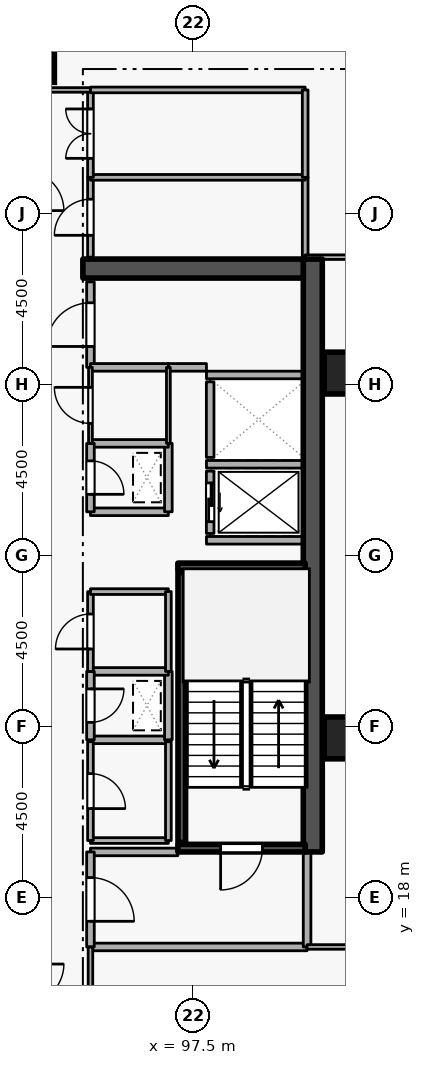
"""IFC4 building model, lengths in metres.
Left out: names, types, materials, properties, quantities, classifications, styles, units other than length and angle.
Written with IfcOpenShell. Run it as: python <this file> out.ifc"""

import sys

from ifc_helpers import new_model, si_unit, direction, frame, frame_2d, origin, origin_2d, place, context, subcontext, project, spatial, rectangle, extrude, element, fill, save


model = new_model("IFC4")
c1 = context("Model", 3, precision=1e-05, world=origin(), true_north=direction((0.0, 1.0)))
c2 = subcontext(c1, "Body", "Model", "MODEL_VIEW")
j1 = project(units=[si_unit("LENGTHUNIT", "METRE"), si_unit("PLANEANGLEUNIT", "RADIAN")], contexts=[c1])
p1 = place(None, origin())
s1 = spatial("IfcSite", under=j1, at=p1, CompositionType="ELEMENT")
p2 = place(p1, origin())
s2 = spatial("IfcBuilding", under=s1, at=p2, CompositionType="ELEMENT")
p3 = place(p2, frame((0.0, 0.0, 163.5)))
s3 = spatial("IfcBuildingStorey", under=s2, at=p3, CompositionType="ELEMENT", Elevation=163.5)
p4 = place(p3, frame((100.65, 19.2, 0.0), z_axis=(0.0, 0.0, 1.0), x_axis=(0.0, 1.0, 0.0)))
e1 = element("IfcWall", 1, at=p4, inside=s3, PredefinedType="SHEAR", context=c2, shape_type="SweptSolid", body=[
    extrude(rectangle(XDim=15.6, YDim=0.5, at=frame_2d((7.8, 0.0))), origin(), (0.0, 0.0, 1.0), 3.6),
])
p5 = place(p3, frame((94.6, 34.55, 0.0), z_axis=(0.0, 0.0, 1.0), x_axis=(1.0, 0.0, 0.0)))
e2 = element("IfcWall", 2, at=p5, inside=s3, PredefinedType="SHEAR", context=c2, shape_type="SweptSolid", body=[
    extrude(rectangle(XDim=5.8, YDim=0.5, at=frame_2d((2.9, 0.0))), origin(), (0.0, 0.0, 1.0), 3.6),
])
for number, where, z_axis, x_axis in (
    (3, (93.3, 40.0, 0.0), (0.0, 0.0, 1.0), (1.0, 0.0, 0.0)),
    (4, (101.5, 22.2, 0.0), (0.0, 0.0, 1.0), (1.0, 0.0, 0.0)),
    (5, (101.5, 31.8, 0.0), (0.0, 0.0, 1.0), (1.0, 0.0, 0.0)),
):
    element("IfcColumn", number, at=place(p3, frame(where, z_axis=z_axis, x_axis=x_axis)), inside=s3, PredefinedType="COLUMN", context=c2, shape_type="SweptSolid", body=[
        extrude(rectangle(XDim=1.1, YDim=1.1, at=origin_2d()), origin(), (0.0, 0.0, 1.0), 3.6),
    ])
p6 = place(p3, frame((97.95, 29.22, 0.0), z_axis=(0.0, 0.0, 1.0), x_axis=(0.0, -1.0, 0.0)))
e6 = element("IfcWall", 6, at=p6, inside=s3, PredefinedType="STANDARD", context=c2, shape_type="SweptSolid", body=[
    extrude(rectangle(XDim=1.64, YDim=0.2, at=frame_2d((0.82, 0.0))), origin(), (0.0, 0.0, 1.0), 3.34),
])
p7 = place(p6, frame((0.31, 0.0, 0.0)))
e7 = element("IfcOpeningElement", 7, at=p7, cuts=e6, PredefinedType="OPENING", context=c2, shape_type="SweptSolid", body=[
    extrude(rectangle(XDim=1.02, YDim=2.06, at=frame_2d((0.51, 1.03))), frame((0.0, 0.11, 0.0), z_axis=(0.0, -1.0, 0.0), x_axis=(1.0, 0.0, 0.0)), (0.0, 0.0, 1.0), 0.22),
])
p8 = place(p3, frame((97.95, 31.57, 0.0), z_axis=(0.0, 0.0, 1.0), x_axis=(0.0, -1.0, 0.0)))
e8 = element("IfcWall", 8, at=p8, inside=s3, PredefinedType="STANDARD", context=c2, shape_type="SweptSolid", body=[
    extrude(rectangle(XDim=1.99, YDim=0.2, at=frame_2d((0.995, 0.0))), origin(), (0.0, 0.0, 1.0), 3.34),
])
for number, where, z_axis, x_axis in (
    (9, (97.852, 29.4, 0.0), (0.0, 0.0, 1.0), (1.0, 0.0, 0.0)),
    (10, (97.852, 27.4, 0.0), (0.0, 0.0, 1.0), (1.0, 0.0, 0.0)),
    (11, (97.852, 31.75, 0.0), (0.0, 0.0, 1.0), (1.0, 0.0, 0.0)),
):
    element("IfcWall", number, at=place(p3, frame(where, z_axis=z_axis, x_axis=x_axis)), inside=s3, PredefinedType="STANDARD", context=c2, shape_type="SweptSolid", body=[
        extrude(rectangle(XDim=2.536, YDim=0.2, at=frame_2d((1.268, 0.0))), origin(), (0.0, 0.0, 1.0), 3.34),
    ])
p9 = place(p3, frame((100.45, 19.3, 0.0), z_axis=(0.0, 0.0, 1.0), x_axis=(-1.0, 0.0, 0.0)))
e12 = element("IfcWall", 12, at=p9, inside=s3, PredefinedType="SHEAR", context=c2, shape_type="SweptSolid", body=[
    extrude(rectangle(XDim=3.35, YDim=0.2, at=frame_2d((1.675, 0.0))), origin(), (0.0, 0.0, 1.0), 3.6),
])
p10 = place(p9, frame((1.125, 0.0, 0.0)))
e13 = element("IfcOpeningElement", 13, at=p10, cuts=e12, PredefinedType="OPENING", context=c2, shape_type="SweptSolid", body=[
    extrude(rectangle(XDim=1.1, YDim=2.1, at=frame_2d((0.55, 1.05))), frame((0.0, 0.11, 0.0), z_axis=(0.0, -1.0, 0.0), x_axis=(1.0, 0.0, 0.0)), (0.0, 0.0, 1.0), 0.22),
])
p11 = place(p3, frame((97.1, 26.7, 0.0), z_axis=(0.0, 0.0, 1.0), x_axis=(1.0, 0.0, 0.0)))
e14 = element("IfcWall", 14, at=p11, inside=s3, PredefinedType="SHEAR", context=c2, shape_type="SweptSolid", body=[
    extrude(rectangle(XDim=3.35, YDim=0.2, at=frame_2d((1.675, 0.0))), origin(), (0.0, 0.0, 1.0), 3.6),
])
p12 = place(p3, frame((97.203, 26.55, 0.0), z_axis=(0.0, 0.0, 1.0), x_axis=(0.0, -1.0, 0.0)))
e15 = element("IfcWall", 15, at=p12, inside=s3, PredefinedType="SHEAR", context=c2, shape_type="SweptSolid", body=[
    extrude(rectangle(XDim=7.1, YDim=0.2, at=frame_2d((3.55, 0.0))), origin(), (0.0, 0.0, 1.0), 3.6),
])
p13 = place(p3, frame((94.8, 16.7, 0.0), z_axis=(0.0, 0.0, 1.0), x_axis=(1.0, 0.0, 0.0)))
e16 = element("IfcWall", 16, at=p13, inside=s3, PredefinedType="STANDARD", context=c2, shape_type="SweptSolid", body=[
    extrude(rectangle(XDim=5.7, YDim=0.2, at=frame_2d((2.85, 0.0))), origin(), (0.0, 0.0, 1.0), 3.34),
])
p14 = place(p3, frame((100.5, 16.7, 0.0), z_axis=(0.0, 0.0, 1.0), x_axis=(0.0, 1.0, 0.0)))
e17 = element("IfcWall", 17, at=p14, inside=s3, PredefinedType="STANDARD", context=c2, shape_type="SweptSolid", body=[
    extrude(rectangle(XDim=2.5, YDim=0.2, at=frame_2d((1.25, 0.0))), origin(), (0.0, 0.0, 1.0), 3.34),
])
p15 = place(p3, frame((97.1, 19.2, 0.0), z_axis=(0.0, 0.0, 1.0), x_axis=(-1.0, 0.0, 0.0)))
e18 = element("IfcWall", 18, at=p15, inside=s3, PredefinedType="STANDARD", context=c2, shape_type="SweptSolid", body=[
    extrude(rectangle(XDim=2.3, YDim=0.2, at=frame_2d((1.15, 0.0))), origin(), (0.0, 0.0, 1.0), 2.545),
])
p16 = place(p3, frame((94.8, 19.2, 0.0), z_axis=(0.0, 0.0, 1.0), x_axis=(0.0, -1.0, 0.0)))
e19 = element("IfcWall", 19, at=p16, inside=s3, PredefinedType="STANDARD", context=c2, shape_type="SweptSolid", body=[
    extrude(rectangle(XDim=2.5, YDim=0.2, at=frame_2d((1.25, 0.0))), origin(), (0.0, 0.0, 1.0), 3.34),
])
p17 = place(p16, frame((0.675, 0.0, 0.0)))
e20 = element("IfcOpeningElement", 20, at=p17, cuts=e19, PredefinedType="OPENING", context=c2, shape_type="SweptSolid", body=[
    extrude(rectangle(XDim=1.15, YDim=2.1, at=frame_2d((0.575, 1.05))), frame((0.0, 0.11, 0.0), z_axis=(0.0, -1.0, 0.0), x_axis=(1.0, 0.0, 0.0)), (0.0, 0.0, 1.0), 0.22),
])
p18 = place(p3, frame((94.8, 28.15, 0.0), z_axis=(0.0, 0.0, 1.0), x_axis=(1.0, 0.0, 0.0)))
e21 = element("IfcWall", 21, at=p18, inside=s3, PredefinedType="STANDARD", context=c2, shape_type="SweptSolid", body=[
    extrude(rectangle(XDim=2.05, YDim=0.2, at=frame_2d((1.025, 0.0))), origin(), (0.0, 0.0, 1.0), 3.34),
])
p19 = place(p3, frame((96.85, 28.15, 0.0), z_axis=(0.0, 0.0, 1.0), x_axis=(0.0, 1.0, 0.0)))
e22 = element("IfcWall", 22, at=p19, inside=s3, PredefinedType="STANDARD", context=c2, shape_type="SweptSolid", body=[
    extrude(rectangle(XDim=1.8, YDim=0.2, at=frame_2d((0.9, 0.0))), origin(), (0.0, 0.0, 1.0), 3.34),
])
p20 = place(p3, frame((96.85, 29.95, 0.0), z_axis=(0.0, 0.0, 1.0), x_axis=(-1.0, 0.0, 0.0)))
e23 = element("IfcWall", 23, at=p20, inside=s3, PredefinedType="STANDARD", context=c2, shape_type="SweptSolid", body=[
    extrude(rectangle(XDim=2.05, YDim=0.2, at=frame_2d((1.025, 0.0))), origin(), (0.0, 0.0, 1.0), 3.34),
])
p21 = place(p3, frame((94.8, 29.95, 0.0), z_axis=(0.0, 0.0, 1.0), x_axis=(0.0, -1.0, 0.0)))
e24 = element("IfcWall", 24, at=p21, inside=s3, PredefinedType="STANDARD", context=c2, shape_type="SweptSolid", body=[
    extrude(rectangle(XDim=1.8, YDim=0.2, at=frame_2d((0.9, 0.0))), origin(), (0.0, 0.0, 1.0), 3.34),
])
p22 = place(p21, frame((0.46, 0.0, 0.0)))
e25 = element("IfcOpeningElement", 25, at=p22, cuts=e24, PredefinedType="OPENING", context=c2, shape_type="SweptSolid", body=[
    extrude(rectangle(XDim=0.88, YDim=2.04, at=frame_2d((0.44, 1.02))), frame((0.0, 0.11, 0.0), z_axis=(0.0, -1.0, 0.0), x_axis=(1.0, 0.0, 0.0)), (0.0, 0.0, 1.0), 0.22),
])
p23 = place(p3, frame((94.8, 22.15, 0.0), z_axis=(0.0, 0.0, 1.0), x_axis=(1.0, 0.0, 0.0)))
e26 = element("IfcWall", 26, at=p23, inside=s3, PredefinedType="STANDARD", context=c2, shape_type="SweptSolid", body=[
    extrude(rectangle(XDim=2.05, YDim=0.2, at=frame_2d((1.025, 0.0))), origin(), (0.0, 0.0, 1.0), 3.34),
])
p24 = place(p3, frame((96.85, 22.15, 0.0), z_axis=(0.0, 0.0, 1.0), x_axis=(0.0, 1.0, 0.0)))
e27 = element("IfcWall", 27, at=p24, inside=s3, PredefinedType="STANDARD", context=c2, shape_type="SweptSolid", body=[
    extrude(rectangle(XDim=1.8, YDim=0.2, at=frame_2d((0.9, 0.0))), origin(), (0.0, 0.0, 1.0), 3.34),
])
p25 = place(p3, frame((96.85, 23.95, 0.0), z_axis=(0.0, 0.0, 1.0), x_axis=(-1.0, 0.0, 0.0)))
e28 = element("IfcWall", 28, at=p25, inside=s3, PredefinedType="STANDARD", context=c2, shape_type="SweptSolid", body=[
    extrude(rectangle(XDim=2.05, YDim=0.2, at=frame_2d((1.025, 0.0))), origin(), (0.0, 0.0, 1.0), 3.34),
])
p26 = place(p3, frame((94.8, 23.95, 0.0), z_axis=(0.0, 0.0, 1.0), x_axis=(0.0, -1.0, 0.0)))
e29 = element("IfcWall", 29, at=p26, inside=s3, PredefinedType="STANDARD", context=c2, shape_type="SweptSolid", body=[
    extrude(rectangle(XDim=1.8, YDim=0.2, at=frame_2d((0.9, 0.0))), origin(), (0.0, 0.0, 1.0), 3.34),
])
p27 = place(p26, frame((0.46, 0.0, 0.0)))
e30 = element("IfcOpeningElement", 30, at=p27, cuts=e29, PredefinedType="OPENING", context=c2, shape_type="SweptSolid", body=[
    extrude(rectangle(XDim=0.88, YDim=2.04, at=frame_2d((0.44, 1.02))), frame((0.0, 0.11, 0.0), z_axis=(0.0, -1.0, 0.0), x_axis=(1.0, 0.0, 0.0)), (0.0, 0.0, 1.0), 0.22),
])
p28 = place(p3, frame((94.8, 31.95, 0.0), z_axis=(0.0, 0.0, 1.0), x_axis=(0.0, 1.0, 0.0)))
e31 = element("IfcWall", 31, at=p28, inside=s3, PredefinedType="STANDARD", context=c2, shape_type="SweptSolid", body=[
    extrude(rectangle(XDim=2.25, YDim=0.2, at=frame_2d((1.125, 0.0))), origin(), (0.0, 0.0, 1.0), 3.34),
])
p29 = place(p28, frame((0.55, 0.0, 0.0)))
e32 = element("IfcOpeningElement", 32, at=p29, cuts=e31, PredefinedType="OPENING", context=c2, shape_type="SweptSolid", body=[
    extrude(rectangle(XDim=1.15, YDim=2.1, at=frame_2d((0.575, 1.05))), frame((0.0, 0.11, 0.0), z_axis=(0.0, -1.0, 0.0), x_axis=(1.0, 0.0, 0.0)), (0.0, 0.0, 1.0), 0.22),
])
p30 = place(p3, frame((97.852, 31.95, 0.0), z_axis=(0.0, 0.0, 1.0), x_axis=(-1.0, 0.0, 0.0)))
e33 = element("IfcWall", 33, at=p30, inside=s3, PredefinedType="STANDARD", context=c2, shape_type="SweptSolid", body=[
    extrude(rectangle(XDim=1.002, YDim=0.2, at=frame_2d((0.501, 0.0))), origin(), (0.0, 0.0, 1.0), 3.34),
])
p31 = place(p3, frame((96.85, 31.95, 0.0), z_axis=(0.0, 0.0, 1.0), x_axis=(-1.0, 0.0, 0.0)))
e34 = element("IfcWall", 34, at=p31, inside=s3, PredefinedType="STANDARD", context=c2, shape_type="SweptSolid", body=[
    extrude(rectangle(XDim=2.05, YDim=0.2, at=frame_2d((1.025, 0.0))), origin(), (0.0, 0.0, 1.0), 3.34),
])
p32 = place(p3, frame((94.8, 19.5, 0.0), z_axis=(0.0, 0.0, 1.0), x_axis=(1.0, 0.0, 0.0)))
e35 = element("IfcWall", 35, at=p32, inside=s3, PredefinedType="PARTITIONING", context=c2, shape_type="SweptSolid", body=[
    extrude(rectangle(XDim=2.05, YDim=0.15, at=frame_2d((1.025, 0.0))), origin(), (0.0, 0.0, 1.0), 2.545),
])
p33 = place(p3, frame((96.85, 19.5, 0.0), z_axis=(0.0, 0.0, 1.0), x_axis=(0.0, 1.0, 0.0)))
e36 = element("IfcWall", 36, at=p33, inside=s3, PredefinedType="PARTITIONING", context=c2, shape_type="SweptSolid", body=[
    extrude(rectangle(XDim=2.6, YDim=0.15, at=frame_2d((1.3, 0.0))), origin(), (0.0, 0.0, 1.0), 3.34),
])
p34 = place(p3, frame((94.8, 22.1, 0.0), z_axis=(0.0, 0.0, 1.0), x_axis=(0.0, -1.0, 0.0)))
e37 = element("IfcWall", 37, at=p34, inside=s3, PredefinedType="PARTITIONING", context=c2, shape_type="SweptSolid", body=[
    extrude(rectangle(XDim=2.6, YDim=0.15, at=frame_2d((1.3, 0.0))), origin(), (0.0, 0.0, 1.0), 3.34),
])
p35 = place(p34, frame((0.84, 0.0, 0.0)))
e38 = element("IfcOpeningElement", 38, at=p35, cuts=e37, PredefinedType="OPENING", context=c2, shape_type="SweptSolid", body=[
    extrude(rectangle(XDim=0.92, YDim=2.08, at=frame_2d((0.46, 1.04))), frame((0.0, 0.085, 0.0), z_axis=(0.0, -1.0, 0.0), x_axis=(1.0, 0.0, 0.0)), (0.0, 0.0, 1.0), 0.17),
])
p36 = place(p3, frame((94.8, 23.95, 0.0), z_axis=(0.0, 0.0, 1.0), x_axis=(0.0, 1.0, 0.0)))
e39 = element("IfcWall", 39, at=p36, inside=s3, PredefinedType="PARTITIONING", context=c2, shape_type="SweptSolid", body=[
    extrude(rectangle(XDim=2.1, YDim=0.15, at=frame_2d((1.05, 0.0))), origin(), (0.0, 0.0, 1.0), 3.34),
])
p37 = place(p36, frame((0.59, 0.0, 0.0)))
e40 = element("IfcOpeningElement", 40, at=p37, cuts=e39, PredefinedType="OPENING", context=c2, shape_type="SweptSolid", body=[
    extrude(rectangle(XDim=0.92, YDim=2.08, at=frame_2d((0.46, 1.04))), frame((0.0, 0.085, 0.0), z_axis=(0.0, -1.0, 0.0), x_axis=(1.0, 0.0, 0.0)), (0.0, 0.0, 1.0), 0.17),
])
p38 = place(p3, frame((94.8, 26.05, 0.0), z_axis=(0.0, 0.0, 1.0), x_axis=(1.0, 0.0, 0.0)))
e41 = element("IfcWall", 41, at=p38, inside=s3, PredefinedType="PARTITIONING", context=c2, shape_type="SweptSolid", body=[
    extrude(rectangle(XDim=2.05, YDim=0.15, at=frame_2d((1.025, 0.0))), origin(), (0.0, 0.0, 1.0), 3.34),
])
p39 = place(p3, frame((96.85, 26.05, 0.0), z_axis=(0.0, 0.0, 1.0), x_axis=(0.0, -1.0, 0.0)))
e42 = element("IfcWall", 42, at=p39, inside=s3, PredefinedType="PARTITIONING", context=c2, shape_type="SweptSolid", body=[
    extrude(rectangle(XDim=2.1, YDim=0.15, at=frame_2d((1.05, 0.0))), origin(), (0.0, 0.0, 1.0), 3.34),
])
p40 = place(p3, frame((94.8, 29.95, 0.0), z_axis=(0.0, 0.0, 1.0), x_axis=(0.0, 1.0, 0.0)))
e43 = element("IfcWall", 43, at=p40, inside=s3, PredefinedType="PARTITIONING", context=c2, shape_type="SweptSolid", body=[
    extrude(rectangle(XDim=2.0, YDim=0.1, at=frame_2d((1.0, 0.0))), origin(), (0.0, 0.0, 1.0), 3.34),
])
p41 = place(p40, frame((0.525, 0.0, 0.0)))
e44 = element("IfcOpeningElement", 44, at=p41, cuts=e43, PredefinedType="OPENING", context=c2, shape_type="SweptSolid", body=[
    extrude(rectangle(XDim=0.95, YDim=2.1, at=frame_2d((0.475, 1.05))), frame((0.0, 0.06, 0.0), z_axis=(0.0, -1.0, 0.0), x_axis=(1.0, 0.0, 0.0)), (0.0, 0.0, 1.0), 0.12),
])
p42 = place(p3, frame((96.85, 31.95, 0.0), z_axis=(0.0, 0.0, 1.0), x_axis=(0.0, -1.0, 0.0)))
e45 = element("IfcWall", 45, at=p42, inside=s3, PredefinedType="PARTITIONING", context=c2, shape_type="SweptSolid", body=[
    extrude(rectangle(XDim=2.0, YDim=0.1, at=frame_2d((1.0, 0.0))), origin(), (0.0, 0.0, 1.0), 3.34),
])
p43 = place(p3, frame((100.45, 36.95, 0.0), z_axis=(0.0, 0.0, 1.0), x_axis=(0.0, -1.0, 0.0)))
e46 = element("IfcWall", 46, at=p43, inside=s3, PredefinedType="PARTITIONING", context=c2, shape_type="SweptSolid", body=[
    extrude(rectangle(XDim=2.1, YDim=0.15, at=frame_2d((1.05, 0.0))), origin(), (0.0, 0.0, 1.0), 3.34),
])
p44 = place(p3, frame((94.8, 34.85, 0.0), z_axis=(0.0, 0.0, 1.0), x_axis=(0.0, 1.0, 0.0)))
e47 = element("IfcWall", 47, at=p44, inside=s3, PredefinedType="PARTITIONING", context=c2, shape_type="SweptSolid", body=[
    extrude(rectangle(XDim=2.1, YDim=0.15, at=frame_2d((1.05, 0.0))), origin(), (0.0, 0.0, 1.0), 3.34),
])
p45 = place(p44, frame((0.575, 0.0, 0.0)))
e48 = element("IfcOpeningElement", 48, at=p45, cuts=e47, PredefinedType="OPENING", context=c2, shape_type="SweptSolid", body=[
    extrude(rectangle(XDim=0.95, YDim=2.1, at=frame_2d((0.475, 1.05))), frame((0.0, 0.085, 0.0), z_axis=(0.0, -1.0, 0.0), x_axis=(1.0, 0.0, 0.0)), (0.0, 0.0, 1.0), 0.17),
])
p46 = place(p3, frame((94.8, 36.95, 0.0), z_axis=(0.0, 0.0, 1.0), x_axis=(1.0, 0.0, 0.0)))
e49 = element("IfcWall", 49, at=p46, inside=s3, PredefinedType="PARTITIONING", context=c2, shape_type="SweptSolid", body=[
    extrude(rectangle(XDim=5.65, YDim=0.15, at=frame_2d((2.825, 0.0))), origin(), (0.0, 0.0, 1.0), 3.34),
])
p47 = place(p3, frame((94.8, 36.95, 0.0), z_axis=(0.0, 0.0, 1.0), x_axis=(0.0, 1.0, 0.0)))
e50 = element("IfcWall", 50, at=p47, inside=s3, PredefinedType="PARTITIONING", context=c2, shape_type="SweptSolid", body=[
    extrude(rectangle(XDim=2.3, YDim=0.15, at=frame_2d((1.15, 0.0))), origin(), (0.0, 0.0, 1.0), 3.34),
])
p48 = place(p47, frame((0.5, 0.0, 0.0)))
e51 = element("IfcOpeningElement", 51, at=p48, cuts=e50, PredefinedType="OPENING", context=c2, shape_type="SweptSolid", body=[
    extrude(rectangle(XDim=1.3, YDim=2.12, at=frame_2d((0.65, 1.06))), frame((0.0, 0.085, 0.0), z_axis=(0.0, -1.0, 0.0), x_axis=(1.0, 0.0, 0.0)), (0.0, 0.0, 1.0), 0.17),
])
p49 = place(p3, frame((94.8, 39.25, 0.0), z_axis=(0.0, 0.0, 1.0), x_axis=(1.0, 0.0, 0.0)))
e52 = element("IfcWall", 52, at=p49, inside=s3, PredefinedType="PARTITIONING", context=c2, shape_type="SweptSolid", body=[
    extrude(rectangle(XDim=5.65, YDim=0.15, at=frame_2d((2.825, 0.0))), origin(), (0.0, 0.0, 1.0), 3.34),
])
p50 = place(p3, frame((100.45, 39.25, 0.0), z_axis=(0.0, 0.0, 1.0), x_axis=(0.0, -1.0, 0.0)))
e53 = element("IfcWall", 53, at=p50, inside=s3, PredefinedType="PARTITIONING", context=c2, shape_type="SweptSolid", body=[
    extrude(rectangle(XDim=2.3, YDim=0.15, at=frame_2d((1.15, 0.0))), origin(), (0.0, 0.0, 1.0), 3.34),
])
p51 = place(p3, frame((94.8, 14.75, 0.0), z_axis=(0.0, 0.0, 1.0), x_axis=(0.0, 1.0, 0.0)))
e54 = element("IfcWall", 54, at=p51, inside=s3, PredefinedType="PARTITIONING", context=c2, shape_type="SweptSolid", body=[
    extrude(rectangle(XDim=1.95, YDim=0.12, at=frame_2d((0.975, 0.0))), origin(), (0.0, 0.0, 1.0), 3.34),
])
p52 = place(p3, frame((100.5, 16.7, 0.0), z_axis=(0.0, 0.0, 1.0), x_axis=(1.0, 0.0, 0.0)))
e55 = element("IfcWall", 55, at=p52, inside=s3, PredefinedType="PARTITIONING", context=c2, shape_type="SweptSolid", body=[
    extrude(rectangle(XDim=11.72, YDim=0.12, at=frame_2d((5.86, 0.0))), origin(), (0.0, 0.0, 1.0), 3.34),
])
p53 = place(p3, frame((94.8, 39.25, 0.0), z_axis=(0.0, 0.0, 1.0), x_axis=(-1.0, 0.0, 0.0)))
e56 = element("IfcWall", 56, at=p53, inside=s3, PredefinedType="PARTITIONING", context=c2, shape_type="SweptSolid", body=[
    extrude(rectangle(XDim=1.75, YDim=0.12, at=frame_2d((0.875, 0.0))), origin(), (0.0, 0.0, 1.0), 3.34),
])
p54 = place(p3, frame((112.22, 34.85, 0.0), z_axis=(0.0, 0.0, 1.0), x_axis=(-1.0, 0.0, 0.0)))
e57 = element("IfcWall", 57, at=p54, inside=s3, PredefinedType="PARTITIONING", context=c2, shape_type="SweptSolid", body=[
    extrude(rectangle(XDim=11.77, YDim=0.12, at=frame_2d((5.885, 0.0))), origin(), (0.0, 0.0, 1.0), 2.545),
])
p55 = place(p7, origin())
e58 = element("IfcDoor", 58, at=p55, inside=s3, OperationType="SLIDING_TO_LEFT", PredefinedType="DOOR", context=c2, shape_type="SweptSolid", body=[
    extrude(rectangle(XDim=1.02, YDim=2.06, at=frame_2d((0.51, 1.03))), frame((0.0, 0.025, 0.0), z_axis=(0.0, -1.0, 0.0), x_axis=(1.0, 0.0, 0.0)), (0.0, 0.0, 1.0), 0.05),
])
fill(e7, e58)
p56 = place(p10, origin())
e59 = element("IfcDoor", 59, at=p56, inside=s3, OperationType="SINGLE_SWING_RIGHT", PredefinedType="DOOR", context=c2, shape_type="SweptSolid", body=[
    extrude(rectangle(XDim=1.1, YDim=2.1, at=frame_2d((0.55, 1.05))), frame((0.0, 0.025, 0.0), z_axis=(0.0, -1.0, 0.0), x_axis=(1.0, 0.0, 0.0)), (0.0, 0.0, 1.0), 0.05),
])
fill(e13, e59)
p57 = place(p17, origin())
e60 = element("IfcDoor", 60, at=p57, inside=s3, OperationType="SINGLE_SWING_RIGHT", PredefinedType="DOOR", context=c2, shape_type="SweptSolid", body=[
    extrude(rectangle(XDim=1.15, YDim=2.1, at=frame_2d((0.575, 1.05))), frame((0.0, 0.025, 0.0), z_axis=(0.0, -1.0, 0.0), x_axis=(1.0, 0.0, 0.0)), (0.0, 0.0, 1.0), 0.05),
])
fill(e20, e60)
p58 = place(p22, origin())
e61 = element("IfcDoor", 61, at=p58, inside=s3, OperationType="SINGLE_SWING_RIGHT", PredefinedType="DOOR", context=c2, shape_type="SweptSolid", body=[
    extrude(rectangle(XDim=0.88, YDim=2.04, at=frame_2d((0.44, 1.02))), frame((0.0, 0.025, 0.0), z_axis=(0.0, -1.0, 0.0), x_axis=(1.0, 0.0, 0.0)), (0.0, 0.0, 1.0), 0.05),
])
fill(e25, e61)
p59 = place(p27, origin())
e62 = element("IfcDoor", 62, at=p59, inside=s3, OperationType="SINGLE_SWING_LEFT", PredefinedType="DOOR", context=c2, shape_type="SweptSolid", body=[
    extrude(rectangle(XDim=0.88, YDim=2.04, at=frame_2d((0.44, 1.02))), frame((0.0, 0.025, 0.0), z_axis=(0.0, -1.0, 0.0), x_axis=(1.0, 0.0, 0.0)), (0.0, 0.0, 1.0), 0.05),
])
fill(e30, e62)
p60 = place(p35, origin())
e63 = element("IfcDoor", 63, at=p60, inside=s3, OperationType="SINGLE_SWING_RIGHT", PredefinedType="DOOR", context=c2, shape_type="SweptSolid", body=[
    extrude(rectangle(XDim=0.92, YDim=2.08, at=frame_2d((0.46, 1.04))), frame((0.0, 0.025, 0.0), z_axis=(0.0, -1.0, 0.0), x_axis=(1.0, 0.0, 0.0)), (0.0, 0.0, 1.0), 0.05),
])
fill(e38, e63)
p61 = place(p37, origin())
e64 = element("IfcDoor", 64, at=p61, inside=s3, OperationType="SINGLE_SWING_LEFT", PredefinedType="DOOR", context=c2, shape_type="SweptSolid", body=[
    extrude(rectangle(XDim=0.92, YDim=2.08, at=frame_2d((0.46, 1.04))), frame((0.0, 0.025, 0.0), z_axis=(0.0, -1.0, 0.0), x_axis=(1.0, 0.0, 0.0)), (0.0, 0.0, 1.0), 0.05),
])
fill(e40, e64)
p62 = place(p41, origin())
e65 = element("IfcDoor", 65, at=p62, inside=s3, OperationType="SINGLE_SWING_RIGHT", PredefinedType="DOOR", context=c2, shape_type="SweptSolid", body=[
    extrude(rectangle(XDim=0.95, YDim=2.1, at=frame_2d((0.475, 1.05))), frame((0.0, 0.025, 0.0), z_axis=(0.0, -1.0, 0.0), x_axis=(1.0, 0.0, 0.0)), (0.0, 0.0, 1.0), 0.05),
])
fill(e44, e65)
p63 = place(p29, origin())
e66 = element("IfcDoor", 66, at=p63, inside=s3, OperationType="SINGLE_SWING_LEFT", PredefinedType="DOOR", context=c2, shape_type="SweptSolid", body=[
    extrude(rectangle(XDim=1.15, YDim=2.1, at=frame_2d((0.575, 1.05))), frame((0.0, 0.025, 0.0), z_axis=(0.0, -1.0, 0.0), x_axis=(1.0, 0.0, 0.0)), (0.0, 0.0, 1.0), 0.05),
])
fill(e32, e66)
p64 = place(p45, origin())
e67 = element("IfcDoor", 67, at=p64, inside=s3, OperationType="SINGLE_SWING_LEFT", PredefinedType="DOOR", context=c2, shape_type="SweptSolid", body=[
    extrude(rectangle(XDim=0.95, YDim=2.1, at=frame_2d((0.475, 1.05))), frame((0.0, 0.025, 0.0), z_axis=(0.0, -1.0, 0.0), x_axis=(1.0, 0.0, 0.0)), (0.0, 0.0, 1.0), 0.05),
])
fill(e48, e67)
p65 = place(p48, origin())
e68 = element("IfcDoor", 68, at=p65, inside=s3, OperationType="DOUBLE_DOOR_SINGLE_SWING", PredefinedType="DOOR", context=c2, shape_type="SweptSolid", body=[
    extrude(rectangle(XDim=1.3, YDim=2.12, at=frame_2d((0.65, 1.06))), frame((0.0, 0.025, 0.0), z_axis=(0.0, -1.0, 0.0), x_axis=(1.0, 0.0, 0.0)), (0.0, 0.0, 1.0), 0.05),
])
fill(e51, e68)
save(model, sys.argv[1])
